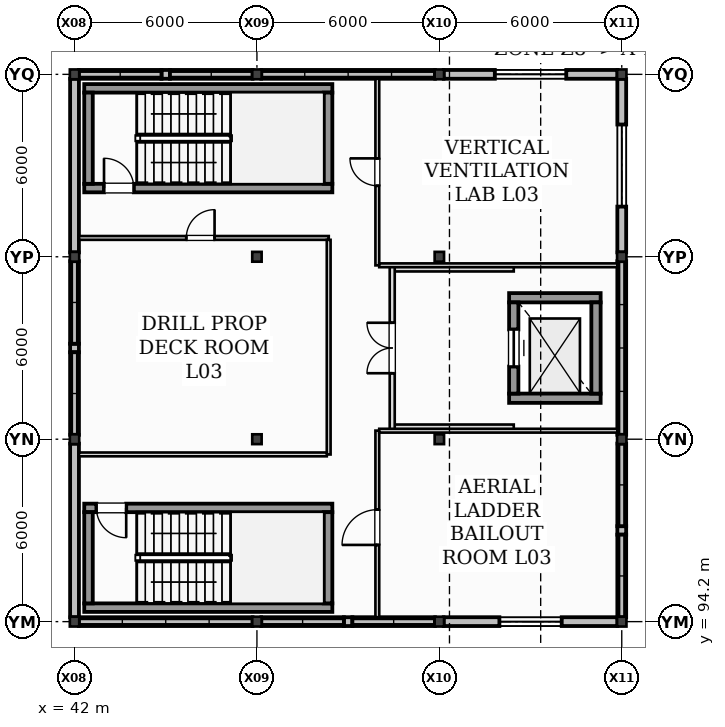
"""IFC4 building model, lengths in metres.
Left out: names, types, materials, properties, quantities, classifications, styles, units other than length and angle.
Written with IfcOpenShell. Run it as: python <this file> out.ifc"""

import sys

from ifc_helpers import new_model, si_unit, direction, frame, frame_2d, origin, origin_2d, place, context, subcontext, project, spatial, rectangle, i_section, extrude, element, fill, save


model = new_model("IFC4")
c1 = context("Model", 3, precision=1e-05, world=origin(), true_north=direction((0.0, 1.0)))
c2 = subcontext(c1, "Body", "Model", "MODEL_VIEW")
j1 = project(units=[si_unit("LENGTHUNIT", "METRE"), si_unit("PLANEANGLEUNIT", "RADIAN")], contexts=[c1])
p1 = place(None, origin())
s1 = spatial("IfcSite", under=j1, at=p1, CompositionType="ELEMENT")
p2 = place(p1, origin())
s2 = spatial("IfcBuilding", under=s1, at=p2, CompositionType="ELEMENT")
p3 = place(p2, frame((0.0, 0.0, 10.0)))
s3 = spatial("IfcBuildingStorey", under=s2, at=p3, CompositionType="ELEMENT", Elevation=10.0)
for number, where, z_axis, x_axis in (
    (1, (42.0, 94.2, 0.0), (0.0, 0.0, 1.0), (1.0, 0.0, 0.0)),
    (2, (42.0, 100.2, 0.0), (0.0, 0.0, 1.0), (1.0, 0.0, 0.0)),
    (3, (42.0, 106.2, 0.0), (0.0, 0.0, 1.0), (1.0, 0.0, 0.0)),
    (4, (42.0, 112.2, 0.0), (0.0, 0.0, 1.0), (1.0, 0.0, 0.0)),
    (5, (48.0, 94.2, 0.0), (0.0, 0.0, 1.0), (1.0, 0.0, 0.0)),
    (6, (48.0, 100.2, 0.0), (0.0, 0.0, 1.0), (1.0, 0.0, 0.0)),
    (7, (48.0, 106.2, 0.0), (0.0, 0.0, 1.0), (1.0, 0.0, 0.0)),
    (8, (48.0, 112.2, 0.0), (0.0, 0.0, 1.0), (1.0, 0.0, 0.0)),
    (9, (54.0, 94.2, 0.0), (0.0, 0.0, 1.0), (1.0, 0.0, 0.0)),
    (10, (54.0, 100.2, 0.0), (0.0, 0.0, 1.0), (1.0, 0.0, 0.0)),
    (11, (54.0, 106.2, 0.0), (0.0, 0.0, 1.0), (1.0, 0.0, 0.0)),
    (12, (54.0, 112.2, 0.0), (0.0, 0.0, 1.0), (1.0, 0.0, 0.0)),
    (13, (60.0, 94.2, 0.0), (0.0, 0.0, 1.0), (1.0, 0.0, 0.0)),
    (14, (60.0, 100.2, 0.0), (0.0, 0.0, 1.0), (1.0, 0.0, 0.0)),
    (15, (60.0, 106.2, 0.0), (0.0, 0.0, 1.0), (1.0, 0.0, 0.0)),
    (16, (60.0, 112.2, 0.0), (0.0, 0.0, 1.0), (1.0, 0.0, 0.0)),
):
    element("IfcColumn", number, at=place(p3, frame(where, z_axis=z_axis, x_axis=x_axis)), inside=s3, PredefinedType="COLUMN", context=c2, shape_type="SweptSolid", body=[
        extrude(i_section(OverallWidth=0.309, OverallDepth=0.323, WebThickness=0.013, FlangeThickness=0.023, at=origin_2d()), origin(), (0.0, 0.0, 1.0), 4.0),
    ])
p4 = place(p3, frame((42.145, 94.2, 0.0), z_axis=(0.0, 0.0, 1.0), x_axis=(1.0, 0.0, 0.0)))
e17 = element("IfcWall", 17, at=p4, inside=s3, PredefinedType="STANDARD", context=c2, shape_type="SweptSolid", body=[
    extrude(rectangle(XDim=5.71, YDim=0.29, at=frame_2d((2.855, 0.0))), origin(), (0.0, 0.0, 1.0), 0.68),
])
p5 = place(p3, frame((50.86, 94.2, 0.0), z_axis=(0.0, 0.0, 1.0), x_axis=(1.0, 0.0, 0.0)))
e18 = element("IfcWall", 18, at=p5, inside=s3, PredefinedType="STANDARD", context=c2, shape_type="SweptSolid", body=[
    extrude(rectangle(XDim=0.28, YDim=0.29, at=frame_2d((0.14, 0.0))), origin(), (0.0, 0.0, 1.0), 3.249),
])
p6 = place(p3, frame((48.145, 94.2, 0.0), z_axis=(0.0, 0.0, 1.0), x_axis=(1.0, 0.0, 0.0)))
e19 = element("IfcWall", 19, at=p6, inside=s3, PredefinedType="STANDARD", context=c2, shape_type="SweptSolid", body=[
    extrude(rectangle(XDim=2.715, YDim=0.29, at=frame_2d((1.357, 0.0))), origin(), (0.0, 0.0, 1.0), 0.8),
])
p7 = place(p3, frame((51.14, 94.2, 0.0), z_axis=(0.0, 0.0, 1.0), x_axis=(1.0, 0.0, 0.0)))
e20 = element("IfcWall", 20, at=p7, inside=s3, PredefinedType="STANDARD", context=c2, shape_type="SweptSolid", body=[
    extrude(rectangle(XDim=2.715, YDim=0.29, at=frame_2d((1.357, 0.0))), origin(), (0.0, 0.0, 1.0), 0.92),
])
p8 = place(p3, frame((54.145, 94.2, 0.0), z_axis=(0.0, 0.0, 1.0), x_axis=(1.0, 0.0, 0.0)))
e21 = element("IfcWall", 21, at=p8, inside=s3, PredefinedType="STANDARD", context=c2, shape_type="SweptSolid", body=[
    extrude(rectangle(XDim=5.71, YDim=0.29, at=frame_2d((2.855, 0.0))), origin(), (0.0, 0.0, 1.0), 3.249),
])
p9 = place(p8, frame((1.83, 0.0, 0.85)))
e22 = element("IfcOpeningElement", 22, at=p9, cuts=e21, PredefinedType="OPENING", context=c2, shape_type="SweptSolid", body=[
    extrude(rectangle(XDim=2.05, YDim=1.75, at=frame_2d((1.025, 0.875))), frame((0.0, 0.155, 0.0), z_axis=(0.0, -1.0, 0.0), x_axis=(1.0, 0.0, 0.0)), (0.0, 0.0, 1.0), 0.31),
])
p10 = place(p3, frame((45.14, 112.2, 0.0), z_axis=(0.0, 0.0, 1.0), x_axis=(-1.0, 0.0, 0.0)))
e23 = element("IfcWall", 23, at=p10, inside=s3, PredefinedType="STANDARD", context=c2, shape_type="SweptSolid", body=[
    extrude(rectangle(XDim=0.28, YDim=0.29, at=frame_2d((0.14, 0.0))), origin(), (0.0, 0.0, 1.0), 3.249),
])
p11 = place(p3, frame((47.855, 112.2, 0.0), z_axis=(0.0, 0.0, 1.0), x_axis=(-1.0, 0.0, 0.0)))
e24 = element("IfcWall", 24, at=p11, inside=s3, PredefinedType="STANDARD", context=c2, shape_type="SweptSolid", body=[
    extrude(rectangle(XDim=2.715, YDim=0.29, at=frame_2d((1.357, 0.0))), origin(), (0.0, 0.0, 1.0), 0.32),
])
p12 = place(p3, frame((44.86, 112.2, 0.0), z_axis=(0.0, 0.0, 1.0), x_axis=(-1.0, 0.0, 0.0)))
e25 = element("IfcWall", 25, at=p12, inside=s3, PredefinedType="STANDARD", context=c2, shape_type="SweptSolid", body=[
    extrude(rectangle(XDim=2.715, YDim=0.29, at=frame_2d((1.357, 0.0))), origin(), (0.0, 0.0, 1.0), 0.44),
])
p13 = place(p3, frame((53.855, 112.2, 0.0), z_axis=(0.0, 0.0, 1.0), x_axis=(-1.0, 0.0, 0.0)))
e26 = element("IfcWall", 26, at=p13, inside=s3, PredefinedType="STANDARD", context=c2, shape_type="SweptSolid", body=[
    extrude(rectangle(XDim=5.71, YDim=0.29, at=frame_2d((2.855, 0.0))), origin(), (0.0, 0.0, 1.0), 0.56),
])
p14 = place(p3, frame((59.855, 112.2, 0.0), z_axis=(0.0, 0.0, 1.0), x_axis=(-1.0, 0.0, 0.0)))
e27 = element("IfcWall", 27, at=p14, inside=s3, PredefinedType="STANDARD", context=c2, shape_type="SweptSolid", body=[
    extrude(rectangle(XDim=5.71, YDim=0.29, at=frame_2d((2.855, 0.0))), origin(), (0.0, 0.0, 1.0), 3.249),
])
p15 = place(p14, frame((1.68, 0.0, 0.85)))
e28 = element("IfcOpeningElement", 28, at=p15, cuts=e27, PredefinedType="OPENING", context=c2, shape_type="SweptSolid", body=[
    extrude(rectangle(XDim=2.35, YDim=1.75, at=frame_2d((1.175, 0.875))), frame((0.0, 0.155, 0.0), z_axis=(0.0, -1.0, 0.0), x_axis=(1.0, 0.0, 0.0)), (0.0, 0.0, 1.0), 0.31),
])
p16 = place(p3, frame((42.0, 100.055, 0.0), z_axis=(0.0, 0.0, 1.0), x_axis=(0.0, -1.0, 0.0)))
e29 = element("IfcWall", 29, at=p16, inside=s3, PredefinedType="STANDARD", context=c2, shape_type="SweptSolid", body=[
    extrude(rectangle(XDim=5.71, YDim=0.29, at=frame_2d((2.855, 0.0))), origin(), (0.0, 0.0, 1.0), 3.253),
])
p17 = place(p3, frame((42.0, 103.34, 0.0), z_axis=(0.0, 0.0, 1.0), x_axis=(0.0, -1.0, 0.0)))
e30 = element("IfcWall", 30, at=p17, inside=s3, PredefinedType="STANDARD", context=c2, shape_type="SweptSolid", body=[
    extrude(rectangle(XDim=0.28, YDim=0.29, at=frame_2d((0.14, 0.0))), origin(), (0.0, 0.0, 1.0), 3.253),
])
p18 = place(p3, frame((42.0, 106.055, 0.0), z_axis=(0.0, 0.0, 1.0), x_axis=(0.0, -1.0, 0.0)))
e31 = element("IfcWall", 31, at=p18, inside=s3, PredefinedType="STANDARD", context=c2, shape_type="SweptSolid", body=[
    extrude(rectangle(XDim=2.715, YDim=0.29, at=frame_2d((1.357, 0.0))), origin(), (0.0, 0.0, 1.0), 0.68),
])
p19 = place(p3, frame((42.0, 103.06, 0.0), z_axis=(0.0, 0.0, 1.0), x_axis=(0.0, -1.0, 0.0)))
e32 = element("IfcWall", 32, at=p19, inside=s3, PredefinedType="STANDARD", context=c2, shape_type="SweptSolid", body=[
    extrude(rectangle(XDim=2.715, YDim=0.29, at=frame_2d((1.357, 0.0))), origin(), (0.0, 0.0, 1.0), 0.8),
])
p20 = place(p3, frame((42.0, 112.055, 0.0), z_axis=(0.0, 0.0, 1.0), x_axis=(0.0, -1.0, 0.0)))
e33 = element("IfcWall", 33, at=p20, inside=s3, PredefinedType="STANDARD", context=c2, shape_type="SweptSolid", body=[
    extrude(rectangle(XDim=5.71, YDim=0.29, at=frame_2d((2.855, 0.0))), origin(), (0.0, 0.0, 1.0), 3.253),
])
p21 = place(p3, frame((60.0, 97.06, 0.0), z_axis=(0.0, 0.0, 1.0), x_axis=(0.0, 1.0, 0.0)))
e34 = element("IfcWall", 34, at=p21, inside=s3, PredefinedType="STANDARD", context=c2, shape_type="SweptSolid", body=[
    extrude(rectangle(XDim=0.28, YDim=0.29, at=frame_2d((0.14, 0.0))), origin(), (0.0, 0.0, 1.0), 3.253),
])
p22 = place(p3, frame((60.0, 94.345, 0.0), z_axis=(0.0, 0.0, 1.0), x_axis=(0.0, 1.0, 0.0)))
e35 = element("IfcWall", 35, at=p22, inside=s3, PredefinedType="STANDARD", context=c2, shape_type="SweptSolid", body=[
    extrude(rectangle(XDim=2.715, YDim=0.29, at=frame_2d((1.357, 0.0))), origin(), (0.0, 0.0, 1.0), 0.92),
])
p23 = place(p3, frame((60.0, 97.34, 0.0), z_axis=(0.0, 0.0, 1.0), x_axis=(0.0, 1.0, 0.0)))
e36 = element("IfcWall", 36, at=p23, inside=s3, PredefinedType="STANDARD", context=c2, shape_type="SweptSolid", body=[
    extrude(rectangle(XDim=2.715, YDim=0.29, at=frame_2d((1.357, 0.0))), origin(), (0.0, 0.0, 1.0), 0.32),
])
p24 = place(p3, frame((60.0, 100.345, 0.0), z_axis=(0.0, 0.0, 1.0), x_axis=(0.0, 1.0, 0.0)))
e37 = element("IfcWall", 37, at=p24, inside=s3, PredefinedType="STANDARD", context=c2, shape_type="SweptSolid", body=[
    extrude(rectangle(XDim=5.71, YDim=0.29, at=frame_2d((2.855, 0.0))), origin(), (0.0, 0.0, 1.0), 0.44),
])
p25 = place(p3, frame((60.0, 106.345, 0.0), z_axis=(0.0, 0.0, 1.0), x_axis=(0.0, 1.0, 0.0)))
e38 = element("IfcWall", 38, at=p25, inside=s3, PredefinedType="STANDARD", context=c2, shape_type="SweptSolid", body=[
    extrude(rectangle(XDim=5.71, YDim=0.29, at=frame_2d((2.855, 0.0))), origin(), (0.0, 0.0, 1.0), 3.253),
])
p26 = place(p25, frame((1.505, 0.0, 0.85)))
e39 = element("IfcOpeningElement", 39, at=p26, cuts=e38, PredefinedType="OPENING", context=c2, shape_type="SweptSolid", body=[
    extrude(rectangle(XDim=2.7, YDim=1.75, at=frame_2d((1.35, 0.875))), frame((0.0, 0.155, 0.0), z_axis=(0.0, -1.0, 0.0), x_axis=(1.0, 0.0, 0.0)), (0.0, 0.0, 1.0), 0.31),
])
p27 = place(p3, frame((42.32, 94.66, 0.0), z_axis=(0.0, 0.0, 1.0), x_axis=(1.0, 0.0, 0.0)))
e40 = element("IfcWall", 40, at=p27, inside=s3, PredefinedType="SHEAR", context=c2, shape_type="SweptSolid", body=[
    extrude(rectangle(XDim=8.16, YDim=0.28, at=frame_2d((4.08, 0.0))), origin(), (0.0, 0.0, 1.0), 4.0),
])
p28 = place(p3, frame((50.48, 97.94, 0.0), z_axis=(0.0, 0.0, 1.0), x_axis=(-1.0, 0.0, 0.0)))
e41 = element("IfcWall", 41, at=p28, inside=s3, PredefinedType="SHEAR", context=c2, shape_type="SweptSolid", body=[
    extrude(rectangle(XDim=8.16, YDim=0.28, at=frame_2d((4.08, 0.0))), origin(), (0.0, 0.0, 1.0), 4.0),
])
p29 = place(p28, frame((6.78, 0.0, 0.0)))
e42 = element("IfcOpeningElement", 42, at=p29, cuts=e41, PredefinedType="OPENING", context=c2, shape_type="SweptSolid", body=[
    extrude(rectangle(XDim=0.98, YDim=2.15, at=frame_2d((0.49, 1.075))), frame((0.0, 0.15, 0.0), z_axis=(0.0, -1.0, 0.0), x_axis=(1.0, 0.0, 0.0)), (0.0, 0.0, 1.0), 0.3),
])
for number, where, z_axis, x_axis in (
    (43, (42.46, 97.8, 0.0), (0.0, 0.0, 1.0), (0.0, -1.0, 0.0)),
    (44, (50.34, 94.8, 0.0), (0.0, 0.0, 1.0), (0.0, 1.0, 0.0)),
):
    element("IfcWall", number, at=place(p3, frame(where, z_axis=z_axis, x_axis=x_axis)), inside=s3, PredefinedType="SHEAR", context=c2, shape_type="SweptSolid", body=[
        extrude(rectangle(XDim=3.0, YDim=0.28, at=frame_2d((1.5, 0.0))), origin(), (0.0, 0.0, 1.0), 4.0),
    ])
p30 = place(p3, frame((42.32, 108.46, 0.0), z_axis=(0.0, 0.0, 1.0), x_axis=(1.0, 0.0, 0.0)))
e45 = element("IfcWall", 45, at=p30, inside=s3, PredefinedType="SHEAR", context=c2, shape_type="SweptSolid", body=[
    extrude(rectangle(XDim=8.16, YDim=0.28, at=frame_2d((4.08, 0.0))), origin(), (0.0, 0.0, 1.0), 4.0),
])
p31 = place(p30, frame((0.65, 0.0, 0.0)))
e46 = element("IfcOpeningElement", 46, at=p31, cuts=e45, PredefinedType="OPENING", context=c2, shape_type="SweptSolid", body=[
    extrude(rectangle(XDim=0.98, YDim=2.15, at=frame_2d((0.49, 1.075))), frame((0.0, 0.15, 0.0), z_axis=(0.0, -1.0, 0.0), x_axis=(1.0, 0.0, 0.0)), (0.0, 0.0, 1.0), 0.3),
])
p32 = place(p3, frame((50.48, 111.74, 0.0), z_axis=(0.0, 0.0, 1.0), x_axis=(-1.0, 0.0, 0.0)))
e47 = element("IfcWall", 47, at=p32, inside=s3, PredefinedType="SHEAR", context=c2, shape_type="SweptSolid", body=[
    extrude(rectangle(XDim=8.16, YDim=0.28, at=frame_2d((4.08, 0.0))), origin(), (0.0, 0.0, 1.0), 4.0),
])
for number, where, z_axis, x_axis in (
    (48, (42.46, 111.6, 0.0), (0.0, 0.0, 1.0), (0.0, -1.0, 0.0)),
    (49, (50.34, 108.6, 0.0), (0.0, 0.0, 1.0), (0.0, 1.0, 0.0)),
):
    element("IfcWall", number, at=place(p3, frame(where, z_axis=z_axis, x_axis=x_axis)), inside=s3, PredefinedType="SHEAR", context=c2, shape_type="SweptSolid", body=[
        extrude(rectangle(XDim=3.0, YDim=0.28, at=frame_2d((1.5, 0.0))), origin(), (0.0, 0.0, 1.0), 4.0),
    ])
for number, where, z_axis, x_axis in (
    (50, (56.295, 101.548, 0.0), (0.0, 0.0, 1.0), (1.0, 0.0, 0.0)),
    (51, (59.305, 104.853, 0.0), (0.0, 0.0, 1.0), (-1.0, 0.0, 0.0)),
):
    element("IfcWall", number, at=place(p3, frame(where, z_axis=z_axis, x_axis=x_axis)), inside=s3, PredefinedType="SHEAR", context=c2, shape_type="SweptSolid", body=[
        extrude(rectangle(XDim=3.01, YDim=0.305, at=frame_2d((1.505, 0.0))), origin(), (0.0, 0.0, 1.0), 4.0),
    ])
p33 = place(p3, frame((56.448, 104.7, 0.0), z_axis=(0.0, 0.0, 1.0), x_axis=(0.0, -1.0, 0.0)))
e52 = element("IfcWall", 52, at=p33, inside=s3, PredefinedType="SHEAR", context=c2, shape_type="SweptSolid", body=[
    extrude(rectangle(XDim=3.0, YDim=0.305, at=frame_2d((1.5, 0.0))), origin(), (0.0, 0.0, 1.0), 4.0),
])
p34 = place(p33, frame((0.89, 0.0, 0.0)))
e53 = element("IfcOpeningElement", 53, at=p34, cuts=e52, PredefinedType="OPENING", context=c2, shape_type="SweptSolid", body=[
    extrude(rectangle(XDim=1.22, YDim=2.22, at=frame_2d((0.61, 1.11))), frame((0.0, 0.162, 0.0), z_axis=(0.0, -1.0, 0.0), x_axis=(1.0, 0.0, 0.0)), (0.0, 0.0, 1.0), 0.325),
])
p35 = place(p3, frame((59.153, 101.7, 0.0), z_axis=(0.0, 0.0, 1.0), x_axis=(0.0, 1.0, 0.0)))
e54 = element("IfcWall", 54, at=p35, inside=s3, PredefinedType="SHEAR", context=c2, shape_type="SweptSolid", body=[
    extrude(rectangle(XDim=3.0, YDim=0.305, at=frame_2d((1.5, 0.0))), origin(), (0.0, 0.0, 1.0), 4.0),
])
for number, where, z_axis, x_axis in (
    (55, (52.45, 100.6, 0.0), (0.0, 0.0, 1.0), (1.0, 0.0, 0.0)),
    (56, (56.448, 105.8, 0.0), (0.0, 0.0, 1.0), (-1.0, 0.0, 0.0)),
):
    element("IfcWall", number, at=place(p3, frame(where, z_axis=z_axis, x_axis=x_axis)), inside=s3, PredefinedType="PARTITIONING", context=c2, shape_type="SweptSolid", body=[
        extrude(rectangle(XDim=3.998, YDim=0.165, at=frame_2d((1.999, 0.0))), origin(), (0.0, 0.0, 1.0), 3.74),
    ])
p36 = place(p3, frame((52.45, 100.52, 0.0), z_axis=(0.0, 0.0, 1.0), x_axis=(0.0, 1.0, 0.0)))
e57 = element("IfcWall", 57, at=p36, inside=s3, PredefinedType="PARTITIONING", context=c2, shape_type="SweptSolid", body=[
    extrude(rectangle(XDim=5.36, YDim=0.165, at=frame_2d((2.68, 0.0))), origin(), (0.0, 0.0, 1.0), 3.74),
])
p37 = place(p36, frame((1.85, 0.0, 0.0)))
e58 = element("IfcOpeningElement", 58, at=p37, cuts=e57, PredefinedType="OPENING", context=c2, shape_type="SweptSolid", body=[
    extrude(rectangle(XDim=1.66, YDim=2.2, at=frame_2d((0.83, 1.1))), frame((0.0, 0.093, 0.0), z_axis=(0.0, -1.0, 0.0), x_axis=(1.0, 0.0, 0.0)), (0.0, 0.0, 1.0), 0.185),
])
p38 = place(p3, frame((42.145, 106.82, 0.0), z_axis=(0.0, 0.0, 1.0), x_axis=(1.0, 0.0, 0.0)))
e59 = element("IfcWall", 59, at=p38, inside=s3, PredefinedType="PARTITIONING", context=c2, shape_type="SweptSolid", body=[
    extrude(rectangle(XDim=8.218, YDim=0.125, at=frame_2d((4.109, 0.0))), origin(), (0.0, 0.0, 1.0), 3.74),
])
p39 = place(p38, frame((3.531, 0.0, 0.0)))
e60 = element("IfcOpeningElement", 60, at=p39, cuts=e59, PredefinedType="OPENING", context=c2, shape_type="SweptSolid", body=[
    extrude(rectangle(XDim=0.93, YDim=2.1, at=frame_2d((0.465, 1.05))), frame((0.0, 0.073, 0.0), z_axis=(0.0, -1.0, 0.0), x_axis=(1.0, 0.0, 0.0)), (0.0, 0.0, 1.0), 0.145),
])
p40 = place(p3, frame((50.36, 106.758, 0.0), z_axis=(0.0, 0.0, 1.0), x_axis=(0.0, -1.0, 0.0)))
e61 = element("IfcWall", 61, at=p40, inside=s3, PredefinedType="PARTITIONING", context=c2, shape_type="SweptSolid", body=[
    extrude(rectangle(XDim=7.06, YDim=0.125, at=frame_2d((3.53, 0.0))), origin(), (0.0, 0.0, 1.0), 3.74),
])
p41 = place(p3, frame((50.298, 99.7, 0.0), z_axis=(0.0, 0.0, 1.0), x_axis=(-1.0, 0.0, 0.0)))
e62 = element("IfcWall", 62, at=p41, inside=s3, PredefinedType="PARTITIONING", context=c2, shape_type="SweptSolid", body=[
    extrude(rectangle(XDim=8.153, YDim=0.125, at=frame_2d((4.076, 0.0))), origin(), (0.0, 0.0, 1.0), 3.74),
])
p42 = place(p3, frame((51.96, 94.345, 0.0), z_axis=(0.0, 0.0, 1.0), x_axis=(0.0, 1.0, 0.0)))
e63 = element("IfcWall", 63, at=p42, inside=s3, PredefinedType="PARTITIONING", context=c2, shape_type="SweptSolid", body=[
    extrude(rectangle(XDim=6.137, YDim=0.125, at=frame_2d((3.069, 0.0))), origin(), (0.0, 0.0, 1.0), 3.399),
])
p43 = place(p42, frame((2.378, 0.0, 0.0)))
e64 = element("IfcOpeningElement", 64, at=p43, cuts=e63, PredefinedType="OPENING", context=c2, shape_type="SweptSolid", body=[
    extrude(rectangle(XDim=1.16, YDim=2.2, at=frame_2d((0.58, 1.1))), frame((0.0, 0.073, 0.0), z_axis=(0.0, -1.0, 0.0), x_axis=(1.0, 0.0, 0.0)), (0.0, 0.0, 1.0), 0.145),
])
p44 = place(p3, frame((52.022, 100.48, 0.0), z_axis=(0.0, 0.0, 1.0), x_axis=(1.0, 0.0, 0.0)))
e65 = element("IfcWall", 65, at=p44, inside=s3, PredefinedType="PARTITIONING", context=c2, shape_type="SweptSolid", body=[
    extrude(rectangle(XDim=7.833, YDim=0.125, at=frame_2d((3.916, 0.0))), origin(), (0.0, 0.0, 1.0), 3.249),
])
p45 = place(p3, frame((51.96, 105.917, 0.0), z_axis=(0.0, 0.0, 1.0), x_axis=(0.0, 1.0, 0.0)))
e66 = element("IfcWall", 66, at=p45, inside=s3, PredefinedType="PARTITIONING", context=c2, shape_type="SweptSolid", body=[
    extrude(rectangle(XDim=6.137, YDim=0.125, at=frame_2d((3.069, 0.0))), origin(), (0.0, 0.0, 1.0), 3.399),
])
p46 = place(p45, frame((2.619, 0.0, 0.0)))
e67 = element("IfcOpeningElement", 67, at=p46, cuts=e66, PredefinedType="OPENING", context=c2, shape_type="SweptSolid", body=[
    extrude(rectangle(XDim=0.9, YDim=2.1, at=frame_2d((0.45, 1.05))), frame((0.0, 0.073, 0.0), z_axis=(0.0, -1.0, 0.0), x_axis=(1.0, 0.0, 0.0)), (0.0, 0.0, 1.0), 0.145),
])
p47 = place(p3, frame((59.855, 105.92, 0.0), z_axis=(0.0, 0.0, 1.0), x_axis=(-1.0, 0.0, 0.0)))
e68 = element("IfcWall", 68, at=p47, inside=s3, PredefinedType="PARTITIONING", context=c2, shape_type="SweptSolid", body=[
    extrude(rectangle(XDim=7.833, YDim=0.125, at=frame_2d((3.916, 0.0))), origin(), (0.0, 0.0, 1.0), 3.249),
])
p48 = place(p9, origin())
e69 = element("IfcWindow", 69, at=p48, inside=s3, PartitioningType="SINGLE_PANEL", PredefinedType="WINDOW", context=c2, shape_type="SweptSolid", body=[
    extrude(rectangle(XDim=2.05, YDim=1.75, at=frame_2d((1.025, 0.875))), frame((0.0, 0.03, 0.0), z_axis=(0.0, -1.0, 0.0), x_axis=(1.0, 0.0, 0.0)), (0.0, 0.0, 1.0), 0.06),
])
fill(e22, e69)
p49 = place(p15, origin())
e70 = element("IfcWindow", 70, at=p49, inside=s3, PartitioningType="SINGLE_PANEL", PredefinedType="WINDOW", context=c2, shape_type="SweptSolid", body=[
    extrude(rectangle(XDim=2.35, YDim=1.75, at=frame_2d((1.175, 0.875))), frame((0.0, 0.03, 0.0), z_axis=(0.0, -1.0, 0.0), x_axis=(1.0, 0.0, 0.0)), (0.0, 0.0, 1.0), 0.06),
])
fill(e28, e70)
p50 = place(p26, origin())
e71 = element("IfcWindow", 71, at=p50, inside=s3, PartitioningType="SINGLE_PANEL", PredefinedType="WINDOW", context=c2, shape_type="SweptSolid", body=[
    extrude(rectangle(XDim=2.7, YDim=1.75, at=frame_2d((1.35, 0.875))), frame((0.0, 0.03, 0.0), z_axis=(0.0, -1.0, 0.0), x_axis=(1.0, 0.0, 0.0)), (0.0, 0.0, 1.0), 0.06),
])
fill(e39, e71)
p51 = place(p29, origin())
e72 = element("IfcDoor", 72, at=p51, inside=s3, OperationType="SINGLE_SWING_LEFT", PredefinedType="DOOR", context=c2, shape_type="SweptSolid", body=[
    extrude(rectangle(XDim=0.98, YDim=2.15, at=frame_2d((0.49, 1.075))), frame((0.0, 0.025, 0.0), z_axis=(0.0, -1.0, 0.0), x_axis=(1.0, 0.0, 0.0)), (0.0, 0.0, 1.0), 0.05),
])
fill(e42, e72)
p52 = place(p31, origin())
e73 = element("IfcDoor", 73, at=p52, inside=s3, OperationType="SINGLE_SWING_LEFT", PredefinedType="DOOR", context=c2, shape_type="SweptSolid", body=[
    extrude(rectangle(XDim=0.98, YDim=2.15, at=frame_2d((0.49, 1.075))), frame((0.0, 0.025, 0.0), z_axis=(0.0, -1.0, 0.0), x_axis=(1.0, 0.0, 0.0)), (0.0, 0.0, 1.0), 0.05),
])
fill(e46, e73)
p53 = place(p34, origin())
e74 = element("IfcDoor", 74, at=p53, inside=s3, OperationType="SLIDING_TO_LEFT", PredefinedType="DOOR", context=c2, shape_type="SweptSolid", body=[
    extrude(rectangle(XDim=1.22, YDim=2.22, at=frame_2d((0.61, 1.11))), frame((0.0, 0.025, 0.0), z_axis=(0.0, -1.0, 0.0), x_axis=(1.0, 0.0, 0.0)), (0.0, 0.0, 1.0), 0.05),
])
fill(e53, e74)
p54 = place(p37, frame((1.66, 0.0, 0.0), z_axis=(0.0, 0.0, 1.0), x_axis=(-1.0, 0.0, 0.0)))
e75 = element("IfcDoor", 75, at=p54, inside=s3, OperationType="DOUBLE_DOOR_SINGLE_SWING", PredefinedType="DOOR", context=c2, shape_type="SweptSolid", body=[
    extrude(rectangle(XDim=1.66, YDim=2.2, at=frame_2d((0.83, 1.1))), frame((0.0, 0.025, 0.0), z_axis=(0.0, -1.0, 0.0), x_axis=(1.0, 0.0, 0.0)), (0.0, 0.0, 1.0), 0.05),
])
fill(e58, e75)
p55 = place(p39, frame((0.93, 0.0, 0.0), z_axis=(0.0, 0.0, 1.0), x_axis=(-1.0, 0.0, 0.0)))
e76 = element("IfcDoor", 76, at=p55, inside=s3, OperationType="SINGLE_SWING_RIGHT", PredefinedType="DOOR", context=c2, shape_type="SweptSolid", body=[
    extrude(rectangle(XDim=0.93, YDim=2.1, at=frame_2d((0.465, 1.05))), frame((0.0, 0.025, 0.0), z_axis=(0.0, -1.0, 0.0), x_axis=(1.0, 0.0, 0.0)), (0.0, 0.0, 1.0), 0.05),
])
fill(e60, e76)
p56 = place(p43, frame((1.16, 0.0, 0.0), z_axis=(0.0, 0.0, 1.0), x_axis=(-1.0, 0.0, 0.0)))
e77 = element("IfcDoor", 77, at=p56, inside=s3, OperationType="SINGLE_SWING_LEFT", PredefinedType="DOOR", context=c2, shape_type="SweptSolid", body=[
    extrude(rectangle(XDim=1.16, YDim=2.2, at=frame_2d((0.58, 1.1))), frame((0.0, 0.025, 0.0), z_axis=(0.0, -1.0, 0.0), x_axis=(1.0, 0.0, 0.0)), (0.0, 0.0, 1.0), 0.05),
])
fill(e64, e77)
p57 = place(p46, frame((0.9, 0.0, 0.0), z_axis=(0.0, 0.0, 1.0), x_axis=(-1.0, 0.0, 0.0)))
e78 = element("IfcDoor", 78, at=p57, inside=s3, OperationType="SINGLE_SWING_RIGHT", PredefinedType="DOOR", context=c2, shape_type="SweptSolid", body=[
    extrude(rectangle(XDim=0.9, YDim=2.1, at=frame_2d((0.45, 1.05))), frame((0.0, 0.025, 0.0), z_axis=(0.0, -1.0, 0.0), x_axis=(1.0, 0.0, 0.0)), (0.0, 0.0, 1.0), 0.05),
])
fill(e67, e78)
save(model, sys.argv[1])
